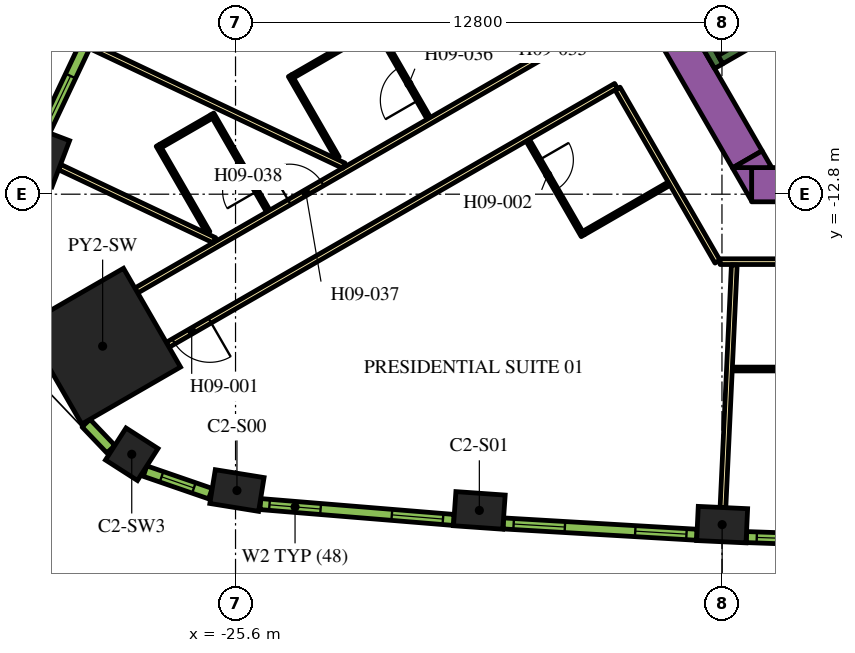
"""IFC4 building model, lengths in metres.
Left out: names, types, materials, properties, quantities, classifications, styles, units other than length and angle.
Written with IfcOpenShell. Run it as: python <this file> out.ifc"""

import sys

from ifc_helpers import new_model, si_unit, direction, frame, frame_2d, origin, origin_2d, place, context, subcontext, project, spatial, polyline, rectangle, outline, extrude, element, fill, save


model = new_model("IFC4")
c1 = context("Model", 3, precision=1e-05, world=origin(), true_north=direction((0.0, 1.0)))
c2 = subcontext(c1, "Body", "Model", "MODEL_VIEW")
j1 = project(units=[si_unit("LENGTHUNIT", "METRE"), si_unit("PLANEANGLEUNIT", "RADIAN")], contexts=[c1])
p1 = place(None, origin())
s1 = spatial("IfcSite", under=j1, at=p1, CompositionType="ELEMENT")
p2 = place(p1, origin())
s2 = spatial("IfcBuilding", under=s1, at=p2, CompositionType="ELEMENT")
p3 = place(p2, frame((0.0, 0.0, 122.7)))
s3 = spatial("IfcBuildingStorey", under=s2, at=p3, CompositionType="ELEMENT", Elevation=122.7)
p4 = place(p3, frame((-29.097, -16.799, 0.0), z_axis=(0.0, 0.0, 1.0), x_axis=(-0.866025403784, -0.5, 0.0)))
e1 = element("IfcColumn", 1, at=p4, inside=s3, PredefinedType="COLUMN", context=c2, shape_type="SweptSolid", body=[
    extrude(rectangle(XDim=3.0, YDim=3.0, at=origin_2d()), origin(), (0.0, 0.0, 1.0), 3.9),
])
for number, where, z_axis, x_axis in (
    (2, (-25.563, -20.597, 0.0), (0.0, 0.0, 1.0), (0.987, -0.159, 0.0)),
    (3, (-19.184, -21.12, 0.0), (0.0, 0.0, 1.0), (0.998, -0.07, 0.0)),
    (4, (-12.795, -21.494, 0.0), (0.0, 0.0, 1.0), (0.999, -0.047, 0.0)),
    (5, (-30.619, -11.839, 0.0), (0.0, 0.0, 1.0), (-0.355, -0.935, 0.0)),
):
    element("IfcColumn", number, at=place(p3, frame(where, z_axis=z_axis, x_axis=x_axis)), inside=s3, PredefinedType="COLUMN", context=c2, shape_type="SweptSolid", body=[
        extrude(rectangle(XDim=1.3, YDim=0.9, at=origin_2d()), origin(), (0.0, 0.0, 1.0), 3.9),
    ])
p5 = place(p3, frame((-28.331, -19.643, 0.0), z_axis=(0.0, 0.0, 1.0), x_axis=(0.841700252504, -0.53994507585, 0.0)))
e6 = element("IfcColumn", 6, at=p5, inside=s3, PredefinedType="COLUMN", context=c2, shape_type="SweptSolid", body=[
    extrude(rectangle(XDim=1.0, YDim=1.0, at=origin_2d()), origin(), (0.0, 0.0, 1.0), 3.9),
])
p6 = place(p3, frame((-12.019, -12.55, 0.0), z_axis=(0.0, 0.0, 1.0), x_axis=(1.0, 0.0, 0.0)))
e7 = element("IfcWall", 7, at=p6, inside=s3, PredefinedType="SOLIDWALL", context=c2, shape_type="SweptSolid", body=[
    extrude(rectangle(XDim=22.083, YDim=0.9, at=frame_2d((11.042, 0.0))), origin(), (0.0, 0.0, 1.0), 3.9),
])
p7 = place(p3, origin())
e8 = element("IfcWall", 8, at=p7, inside=s3, PredefinedType="SOLIDWALL", context=c2, shape_type="SweptSolid", body=[
    extrude(outline(polyline([(-12.529, -12.1), (-12.021, -12.1), (-12.021, -12.98), (-12.529, -12.1)])), origin(), (0.0, 0.0, 1.0), 3.9),
])
p8 = place(p3, frame((-12.134, -11.883, 0.0), z_axis=(0.0, 0.0, 1.0), x_axis=(-0.500005339912, 0.866022320763, 0.0)))
e9 = element("IfcWall", 9, at=p8, inside=s3, PredefinedType="SOLIDWALL", context=c2, shape_type="SweptSolid", body=[
    extrude(rectangle(XDim=9.488, YDim=0.9, at=frame_2d((4.744, 0.0))), origin(), (0.0, 0.0, 1.0), 3.9),
])
e10 = element("IfcWall", 10, at=p7, inside=s3, PredefinedType="SOLIDWALL", context=c2, shape_type="SweptSolid", body=[
    extrude(outline(polyline([(-11.489, -12.1), (-12.505, -12.1), (-11.743, -11.66), (-11.489, -12.1)])), origin(), (0.0, 0.0, 1.0), 3.9),
])
p9 = place(p3, frame((-12.885, -9.431, 0.0), z_axis=(0.0, 0.0, 1.0), x_axis=(-0.500020560727, 0.866013532718, 0.0)))
e11 = element("IfcWall", 11, at=p9, inside=s3, PredefinedType="SOLIDWALL", context=c2, shape_type="SweptSolid", body=[
    extrude(rectangle(XDim=3.45, YDim=0.25, at=frame_2d((1.725, 0.0))), origin(), (0.0, 0.0, 1.0), 3.9),
])
p10 = place(p3, frame((-12.84, -9.261, 0.0), z_axis=(0.0, 0.0, 1.0), x_axis=(0.866016039709, 0.500016218704, 0.0)))
e12 = element("IfcWall", 12, at=p10, inside=s3, PredefinedType="SOLIDWALL", context=c2, shape_type="SweptSolid", body=[
    extrude(rectangle(XDim=7.05, YDim=0.25, at=frame_2d((3.525, 0.0))), origin(), (0.0, 0.0, 1.0), 3.9),
])
p11 = place(p3, frame((-28.211, -15.335, 0.0), z_axis=(0.0, 0.0, 1.0), x_axis=(0.866025884867, 0.49999916674, 0.0)))
e13 = element("IfcWall", 13, at=p11, inside=s3, PredefinedType="PARTITIONING", context=c2, shape_type="SweptSolid", body=[
    extrude(rectangle(XDim=13.543, YDim=0.15, at=frame_2d((6.772, 0.0))), origin(), (0.0, 0.0, 1.0), 2.75),
])
p12 = place(p11, frame((12.114, 0.0, 0.0)))
e14 = element("IfcOpeningElement", 14, at=p12, cuts=e13, PredefinedType="OPENING", context=c2, shape_type="SweptSolid", body=[
    extrude(rectangle(XDim=1.1, YDim=2.1, at=frame_2d((0.55, 1.05))), frame((0.0, 0.085, 0.0), z_axis=(0.0, -1.0, 0.0), x_axis=(1.0, 0.0, 0.0)), (0.0, 0.0, 1.0), 0.17),
])
p13 = place(p11, frame((4.65, 0.0, 0.0)))
e15 = element("IfcOpeningElement", 15, at=p13, cuts=e13, PredefinedType="OPENING", context=c2, shape_type="SweptSolid", body=[
    extrude(rectangle(XDim=1.0, YDim=2.1, at=frame_2d((0.5, 1.05))), frame((0.0, 0.085, 0.0), z_axis=(0.0, -1.0, 0.0), x_axis=(1.0, 0.0, 0.0)), (0.0, 0.0, 1.0), 0.17),
])
p14 = place(p3, frame((-15.587, -9.952, 0.0), z_axis=(0.0, 0.0, 1.0), x_axis=(-0.866017869832, -0.500013048961, 0.0)))
e16 = element("IfcWall", 16, at=p14, inside=s3, PredefinedType="PARTITIONING", context=c2, shape_type="SweptSolid", body=[
    extrude(rectangle(XDim=13.624, YDim=0.15, at=frame_2d((6.812, 0.0))), origin(), (0.0, 0.0, 1.0), 2.75),
])
p15 = place(p14, frame((12.344, 0.0, 0.0)))
e17 = element("IfcOpeningElement", 17, at=p15, cuts=e16, PredefinedType="OPENING", context=c2, shape_type="SweptSolid", body=[
    extrude(rectangle(XDim=1.1, YDim=2.1, at=frame_2d((0.55, 1.05))), frame((0.0, 0.085, 0.0), z_axis=(0.0, -1.0, 0.0), x_axis=(1.0, 0.0, 0.0)), (0.0, 0.0, 1.0), 0.17),
])
p16 = place(p3, frame((-12.918, -14.575, 0.0), z_axis=(0.0, 0.0, 1.0), x_axis=(-0.500009150678, 0.866020120573, 0.0)))
e18 = element("IfcWall", 18, at=p16, inside=s3, PredefinedType="PARTITIONING", context=c2, shape_type="SweptSolid", body=[
    extrude(rectangle(XDim=5.258, YDim=0.15, at=frame_2d((2.629, 0.0))), origin(), (0.0, 0.0, 1.0), 2.75),
])
p17 = place(p3, frame((12.918, -14.575, 0.0), z_axis=(0.0, 0.0, 1.0), x_axis=(-1.0, 0.0, 0.0)))
e19 = element("IfcWall", 19, at=p17, inside=s3, PredefinedType="PARTITIONING", context=c2, shape_type="SweptSolid", body=[
    extrude(rectangle(XDim=25.766, YDim=0.15, at=frame_2d((12.883, 0.0))), origin(), (0.0, 0.0, 1.0), 2.75),
])
p18 = place(p17, frame((16.189, 0.0, 0.0)))
e20 = element("IfcOpeningElement", 20, at=p18, cuts=e19, PredefinedType="OPENING", context=c2, shape_type="SweptSolid", body=[
    extrude(rectangle(XDim=1.0, YDim=2.1, at=frame_2d((0.5, 1.05))), frame((0.0, 0.085, 0.0), z_axis=(0.0, -1.0, 0.0), x_axis=(1.0, 0.0, 0.0)), (0.0, 0.0, 1.0), 0.17),
])
p19 = place(p17, frame((14.882, 0.0, 0.0)))
e21 = element("IfcOpeningElement", 21, at=p19, cuts=e19, PredefinedType="OPENING", context=c2, shape_type="SweptSolid", body=[
    extrude(rectangle(XDim=1.0, YDim=2.1, at=frame_2d((0.5, 1.05))), frame((0.0, 0.085, 0.0), z_axis=(0.0, -1.0, 0.0), x_axis=(1.0, 0.0, 0.0)), (0.0, 0.0, 1.0), 0.17),
])
p20 = place(p17, frame((0.596, 0.0, 0.0)))
e22 = element("IfcOpeningElement", 22, at=p20, cuts=e19, PredefinedType="OPENING", context=c2, shape_type="SweptSolid", body=[
    extrude(rectangle(XDim=1.1, YDim=2.1, at=frame_2d((0.55, 1.05))), frame((0.0, 0.085, 0.0), z_axis=(0.0, -1.0, 0.0), x_axis=(1.0, 0.0, 0.0)), (0.0, 0.0, 1.0), 0.17),
])
p21 = place(p3, frame((-30.231, -12.085, 0.0), z_axis=(0.0, 0.0, 1.0), x_axis=(0.904001132572, -0.427530060122, 0.0)))
e23 = element("IfcWall", 23, at=p21, inside=s3, PredefinedType="PARTITIONING", context=c2, shape_type="SweptSolid", body=[
    extrude(rectangle(XDim=4.51, YDim=0.15, at=frame_2d((2.255, 0.0))), origin(), (0.0, 0.0, 1.0), 2.75),
])
p22 = place(p3, frame((-29.406, -8.901, 0.0), z_axis=(0.0, 0.0, 1.0), x_axis=(0.904002363742, -0.427527456836, 0.0)))
e24 = element("IfcWall", 24, at=p22, inside=s3, PredefinedType="PARTITIONING", context=c2, shape_type="SweptSolid", body=[
    extrude(rectangle(XDim=7.362, YDim=0.15, at=frame_2d((3.681, 0.0))), origin(), (0.0, 0.0, 1.0), 2.75),
])
p23 = place(p3, frame((-12.774, -21.045, 0.0), z_axis=(0.0, 0.0, 1.0), x_axis=(0.046750341626, 0.998906605023, 0.0)))
e25 = element("IfcWall", 25, at=p23, inside=s3, PredefinedType="PARTITIONING", context=c2, shape_type="SweptSolid", body=[
    extrude(rectangle(XDim=6.392, YDim=0.15, at=frame_2d((3.196, 0.0))), origin(), (0.0, 0.0, 1.0), 2.75),
])
p24 = place(p3, frame((-17.91, -11.38, 0.0), z_axis=(0.0, 0.0, 1.0), x_axis=(0.499987231761, -0.866032775405, 0.0)))
e26 = element("IfcWall", 26, at=p24, inside=s3, PredefinedType="PARTITIONING", context=c2, shape_type="SweptSolid", body=[
    extrude(rectangle(XDim=2.9, YDim=0.1, at=frame_2d((1.45, 0.0))), origin(), (0.0, 0.0, 1.0), 2.75),
])
p25 = place(p24, frame((0.6, 0.0, 0.0)))
e27 = element("IfcOpeningElement", 27, at=p25, cuts=e26, PredefinedType="OPENING", context=c2, shape_type="SweptSolid", body=[
    extrude(rectangle(XDim=0.9, YDim=2.1, at=frame_2d((0.45, 1.05))), frame((0.0, 0.06, 0.0), z_axis=(0.0, -1.0, 0.0), x_axis=(1.0, 0.0, 0.0)), (0.0, 0.0, 1.0), 0.12),
])
p26 = place(p3, frame((-16.442, -13.823, 0.0), z_axis=(0.0, 0.0, 1.0), x_axis=(0.866021400173, 0.500006934395, 0.0)))
e28 = element("IfcWall", 28, at=p26, inside=s3, PredefinedType="PARTITIONING", context=c2, shape_type="SweptSolid", body=[
    extrude(rectangle(XDim=2.6, YDim=0.1, at=frame_2d((1.3, 0.0))), origin(), (0.0, 0.0, 1.0), 2.75),
])
p27 = place(p3, frame((-10.072, -17.4, 0.0), z_axis=(0.0, 0.0, 1.0), x_axis=(-1.0, 0.0, 0.0)))
e29 = element("IfcWall", 29, at=p27, inside=s3, PredefinedType="PARTITIONING", context=c2, shape_type="SweptSolid", body=[
    extrude(rectangle(XDim=2.45, YDim=0.1, at=frame_2d((1.225, 0.0))), origin(), (0.0, 0.0, 1.0), 2.75),
])
p28 = place(p3, frame((-20.515, -10.805, 0.0), z_axis=(0.0, 0.0, 1.0), x_axis=(-0.49994636267, 0.866056369097, 0.0)))
e30 = element("IfcWall", 30, at=p28, inside=s3, PredefinedType="PARTITIONING", context=c2, shape_type="SweptSolid", body=[
    extrude(rectangle(XDim=2.8, YDim=0.1, at=frame_2d((1.4, 0.0))), origin(), (0.0, 0.0, 1.0), 2.75),
])
p29 = place(p28, frame((0.55, 0.0, 0.0)))
e31 = element("IfcOpeningElement", 31, at=p29, cuts=e30, PredefinedType="OPENING", context=c2, shape_type="SweptSolid", body=[
    extrude(rectangle(XDim=1.0, YDim=2.1, at=frame_2d((0.5, 1.05))), frame((0.0, 0.06, 0.0), z_axis=(0.0, -1.0, 0.0), x_axis=(1.0, 0.0, 0.0)), (0.0, 0.0, 1.0), 0.12),
])
for number, where, z_axis, x_axis in (
    (32, (-21.933, -8.448, 0.0), (0.0, 0.0, 1.0), (-0.866, -0.5, 0.0)),
    (33, (-22.916, -11.845, 0.0), (0.0, 0.0, 1.0), (-0.5, 0.866, 0.0)),
):
    element("IfcWall", number, at=place(p3, frame(where, z_axis=z_axis, x_axis=x_axis)), inside=s3, PredefinedType="PARTITIONING", context=c2, shape_type="SweptSolid", body=[
        extrude(rectangle(XDim=2.5, YDim=0.1, at=frame_2d((1.25, 0.0))), origin(), (0.0, 0.0, 1.0), 2.75),
    ])
p30 = place(p3, frame((-24.74, -13.244, 0.0), z_axis=(0.0, 0.0, 1.0), x_axis=(-0.500037662692, 0.866003658127, 0.0)))
e34 = element("IfcWall", 34, at=p30, inside=s3, PredefinedType="PARTITIONING", context=c2, shape_type="SweptSolid", body=[
    extrude(rectangle(XDim=2.95, YDim=0.1, at=frame_2d((1.475, 0.0))), origin(), (0.0, 0.0, 1.0), 2.75),
])
p31 = place(p30, frame((0.6, 0.0, 0.0)))
e35 = element("IfcOpeningElement", 35, at=p31, cuts=e34, PredefinedType="OPENING", context=c2, shape_type="SweptSolid", body=[
    extrude(rectangle(XDim=0.9, YDim=2.1, at=frame_2d((0.45, 1.05))), frame((0.0, 0.06, 0.0), z_axis=(0.0, -1.0, 0.0), x_axis=(1.0, 0.0, 0.0)), (0.0, 0.0, 1.0), 0.12),
])
p32 = place(p3, frame((-26.233, -10.758, 0.0), z_axis=(0.0, 0.0, 1.0), x_axis=(-0.866043940782, -0.499967891604, 0.0)))
e36 = element("IfcWall", 36, at=p32, inside=s3, PredefinedType="PARTITIONING", context=c2, shape_type="SweptSolid", body=[
    extrude(rectangle(XDim=1.55, YDim=0.1, at=frame_2d((0.775, 0.0))), origin(), (0.0, 0.0, 1.0), 2.75),
])
p33 = place(p3, frame((-26.319, -13.81, 0.0), z_axis=(0.0, 0.0, 1.0), x_axis=(-0.499953715521, 0.866052124492, 0.0)))
e37 = element("IfcWall", 37, at=p33, inside=s3, PredefinedType="PARTITIONING", context=c2, shape_type="SweptSolid", body=[
    extrude(rectangle(XDim=2.65, YDim=0.1, at=frame_2d((1.325, 0.0))), origin(), (0.0, 0.0, 1.0), 2.75),
])
p34 = place(p3, frame((-24.946, -20.954, 0.0), z_axis=(0.0, 0.0, 1.0), x_axis=(0.99665273362, -0.081751627308, 0.0)))
e38 = element("IfcWall", 38, at=p34, inside=s3, PredefinedType="SOLIDWALL", context=c2, shape_type="SweptSolid", body=[
    extrude(rectangle(XDim=5.107, YDim=0.29, at=frame_2d((2.553, 0.0))), origin(), (0.0, 0.0, 1.0), 3.65),
])
p35 = place(p34, frame((0.24, 0.0, 0.9)))
e39 = element("IfcOpeningElement", 39, at=p35, cuts=e38, PredefinedType="OPENING", context=c2, shape_type="SweptSolid", body=[
    extrude(rectangle(XDim=1.35, YDim=2.15, at=frame_2d((0.675, 1.075))), frame((0.0, 0.155, 0.0), z_axis=(0.0, -1.0, 0.0), x_axis=(1.0, 0.0, 0.0)), (0.0, 0.0, 1.0), 0.31),
])
p36 = place(p34, frame((3.471, 0.0, 0.9)))
e40 = element("IfcOpeningElement", 40, at=p36, cuts=e38, PredefinedType="OPENING", context=c2, shape_type="SweptSolid", body=[
    extrude(rectangle(XDim=1.35, YDim=2.15, at=frame_2d((0.675, 1.075))), frame((0.0, 0.155, 0.0), z_axis=(0.0, -1.0, 0.0), x_axis=(1.0, 0.0, 0.0)), (0.0, 0.0, 1.0), 0.31),
])
p37 = place(p3, frame((-18.553, -21.463, 0.0), z_axis=(0.0, 0.0, 1.0), x_axis=(0.998290511436, -0.058447025388, 0.0)))
e41 = element("IfcWall", 41, at=p37, inside=s3, PredefinedType="SOLIDWALL", context=c2, shape_type="SweptSolid", body=[
    extrude(rectangle(XDim=5.1, YDim=0.29, at=frame_2d((2.55, 0.0))), origin(), (0.0, 0.0, 1.0), 3.65),
])
p38 = place(p37, frame((0.273, 0.0, 0.9)))
e42 = element("IfcOpeningElement", 42, at=p38, cuts=e41, PredefinedType="OPENING", context=c2, shape_type="SweptSolid", body=[
    extrude(rectangle(XDim=1.35, YDim=2.15, at=frame_2d((0.675, 1.075))), frame((0.0, 0.155, 0.0), z_axis=(0.0, -1.0, 0.0), x_axis=(1.0, 0.0, 0.0)), (0.0, 0.0, 1.0), 0.31),
])
p39 = place(p37, frame((3.478, 0.0, 0.9)))
e43 = element("IfcOpeningElement", 43, at=p39, cuts=e41, PredefinedType="OPENING", context=c2, shape_type="SweptSolid", body=[
    extrude(rectangle(XDim=1.35, YDim=2.15, at=frame_2d((0.675, 1.075))), frame((0.0, 0.155, 0.0), z_axis=(0.0, -1.0, 0.0), x_axis=(1.0, 0.0, 0.0)), (0.0, 0.0, 1.0), 0.31),
])
p40 = place(p3, frame((-12.157, -21.822, 0.0), z_axis=(0.0, 0.0, 1.0), x_axis=(0.999385993957, -0.035037623812, 0.0)))
e44 = element("IfcWall", 44, at=p40, inside=s3, PredefinedType="SOLIDWALL", context=c2, shape_type="SweptSolid", body=[
    extrude(rectangle(XDim=5.101, YDim=0.29, at=frame_2d((2.55, 0.0))), origin(), (0.0, 0.0, 1.0), 3.65),
])
p41 = place(p40, frame((0.273, 0.0, 0.9)))
e45 = element("IfcOpeningElement", 45, at=p41, cuts=e44, PredefinedType="OPENING", context=c2, shape_type="SweptSolid", body=[
    extrude(rectangle(XDim=1.35, YDim=2.15, at=frame_2d((0.675, 1.075))), frame((0.0, 0.155, 0.0), z_axis=(0.0, -1.0, 0.0), x_axis=(1.0, 0.0, 0.0)), (0.0, 0.0, 1.0), 0.31),
])
p42 = place(p40, frame((3.478, 0.0, 0.9)))
e46 = element("IfcOpeningElement", 46, at=p42, cuts=e44, PredefinedType="OPENING", context=c2, shape_type="SweptSolid", body=[
    extrude(rectangle(XDim=1.35, YDim=2.15, at=frame_2d((0.675, 1.075))), frame((0.0, 0.155, 0.0), z_axis=(0.0, -1.0, 0.0), x_axis=(1.0, 0.0, 0.0)), (0.0, 0.0, 1.0), 0.31),
])
p43 = place(p3, frame((-28.436, -6.511, 0.0), z_axis=(0.0, 0.0, 1.0), x_axis=(-0.427543726596, -0.903994669148, 0.0)))
e47 = element("IfcWall", 47, at=p43, inside=s3, PredefinedType="SOLIDWALL", context=c2, shape_type="SweptSolid", body=[
    extrude(rectangle(XDim=5.107, YDim=0.29, at=frame_2d((2.553, 0.0))), origin(), (0.0, 0.0, 1.0), 3.65),
])
p44 = place(p43, frame((0.285, 0.0, 0.9)))
e48 = element("IfcOpeningElement", 48, at=p44, cuts=e47, PredefinedType="OPENING", context=c2, shape_type="SweptSolid", body=[
    extrude(rectangle(XDim=1.35, YDim=2.15, at=frame_2d((0.675, 1.075))), frame((0.0, 0.155, 0.0), z_axis=(0.0, -1.0, 0.0), x_axis=(1.0, 0.0, 0.0)), (0.0, 0.0, 1.0), 0.31),
])
p45 = place(p43, frame((3.516, 0.0, 0.9)))
e49 = element("IfcOpeningElement", 49, at=p45, cuts=e47, PredefinedType="OPENING", context=c2, shape_type="SweptSolid", body=[
    extrude(rectangle(XDim=1.35, YDim=2.15, at=frame_2d((0.675, 1.075))), frame((0.0, 0.155, 0.0), z_axis=(0.0, -1.0, 0.0), x_axis=(1.0, 0.0, 0.0)), (0.0, 0.0, 1.0), 0.31),
])
p46 = place(p3, frame((-29.534, -18.824, 0.0), z_axis=(0.0, 0.0, 1.0), x_axis=(0.690414427296, -0.723414071319, 0.0)))
e50 = element("IfcWall", 50, at=p46, inside=s3, PredefinedType="SOLIDWALL", context=c2, shape_type="SweptSolid", body=[
    extrude(rectangle(XDim=0.947, YDim=0.29, at=frame_2d((0.474, 0.0))), origin(), (0.0, 0.0, 1.0), 3.65),
])
p47 = place(p3, frame((-27.981, -20.086, 0.0), z_axis=(0.0, 0.0, 1.0), x_axis=(0.945385815453, -0.325953462844, 0.0)))
e51 = element("IfcWall", 51, at=p47, inside=s3, PredefinedType="SOLIDWALL", context=c2, shape_type="SweptSolid", body=[
    extrude(rectangle(XDim=1.819, YDim=0.29, at=frame_2d((0.91, 0.0))), origin(), (0.0, 0.0, 1.0), 3.65),
])
p48 = place(p47, frame((0.46, 0.0, 0.9)))
e52 = element("IfcOpeningElement", 52, at=p48, cuts=e51, PredefinedType="OPENING", context=c2, shape_type="SweptSolid", body=[
    extrude(rectangle(XDim=0.9, YDim=2.15, at=frame_2d((0.45, 1.075))), frame((0.0, 0.155, 0.0), z_axis=(0.0, -1.0, 0.0), x_axis=(1.0, 0.0, 0.0)), (0.0, 0.0, 1.0), 0.31),
])
p49 = place(p15, origin())
e53 = element("IfcDoor", 53, at=p49, inside=s3, OperationType="SINGLE_SWING_RIGHT", PredefinedType="DOOR", context=c2, shape_type="SweptSolid", body=[
    extrude(rectangle(XDim=1.1, YDim=2.1, at=frame_2d((0.55, 1.05))), frame((0.0, 0.025, 0.0), z_axis=(0.0, -1.0, 0.0), x_axis=(1.0, 0.0, 0.0)), (0.0, 0.0, 1.0), 0.05),
])
fill(e17, e53)
p50 = place(p25, origin())
e54 = element("IfcDoor", 54, at=p50, inside=s3, OperationType="SINGLE_SWING_LEFT", PredefinedType="DOOR", context=c2, shape_type="SweptSolid", body=[
    extrude(rectangle(XDim=0.9, YDim=2.1, at=frame_2d((0.45, 1.05))), frame((0.0, 0.025, 0.0), z_axis=(0.0, -1.0, 0.0), x_axis=(1.0, 0.0, 0.0)), (0.0, 0.0, 1.0), 0.05),
])
fill(e27, e54)
p51 = place(p12, origin())
e55 = element("IfcDoor", 55, at=p51, inside=s3, OperationType="SINGLE_SWING_RIGHT", PredefinedType="DOOR", context=c2, shape_type="SweptSolid", body=[
    extrude(rectangle(XDim=1.1, YDim=2.1, at=frame_2d((0.55, 1.05))), frame((0.0, 0.025, 0.0), z_axis=(0.0, -1.0, 0.0), x_axis=(1.0, 0.0, 0.0)), (0.0, 0.0, 1.0), 0.05),
])
fill(e14, e55)
p52 = place(p29, origin())
e56 = element("IfcDoor", 56, at=p52, inside=s3, OperationType="SINGLE_SWING_LEFT", PredefinedType="DOOR", context=c2, shape_type="SweptSolid", body=[
    extrude(rectangle(XDim=1.0, YDim=2.1, at=frame_2d((0.5, 1.05))), frame((0.0, 0.025, 0.0), z_axis=(0.0, -1.0, 0.0), x_axis=(1.0, 0.0, 0.0)), (0.0, 0.0, 1.0), 0.05),
])
fill(e31, e56)
p53 = place(p13, origin())
e57 = element("IfcDoor", 57, at=p53, inside=s3, OperationType="SINGLE_SWING_RIGHT", PredefinedType="DOOR", context=c2, shape_type="SweptSolid", body=[
    extrude(rectangle(XDim=1.0, YDim=2.1, at=frame_2d((0.5, 1.05))), frame((0.0, 0.025, 0.0), z_axis=(0.0, -1.0, 0.0), x_axis=(1.0, 0.0, 0.0)), (0.0, 0.0, 1.0), 0.05),
])
fill(e15, e57)
p54 = place(p31, origin())
e58 = element("IfcDoor", 58, at=p54, inside=s3, OperationType="SINGLE_SWING_LEFT", PredefinedType="DOOR", context=c2, shape_type="SweptSolid", body=[
    extrude(rectangle(XDim=0.9, YDim=2.1, at=frame_2d((0.45, 1.05))), frame((0.0, 0.025, 0.0), z_axis=(0.0, -1.0, 0.0), x_axis=(1.0, 0.0, 0.0)), (0.0, 0.0, 1.0), 0.05),
])
fill(e35, e58)
p55 = place(p35, origin())
e59 = element("IfcWindow", 59, at=p55, inside=s3, PartitioningType="DOUBLE_PANEL_VERTICAL", PredefinedType="WINDOW", context=c2, shape_type="SweptSolid", body=[
    extrude(rectangle(XDim=1.35, YDim=2.15, at=frame_2d((0.675, 1.075))), frame((0.0, 0.015, 0.0), z_axis=(0.0, -1.0, 0.0), x_axis=(1.0, 0.0, 0.0)), (0.0, 0.0, 1.0), 0.06),
])
fill(e39, e59)
p56 = place(p36, origin())
e60 = element("IfcWindow", 60, at=p56, inside=s3, PartitioningType="DOUBLE_PANEL_VERTICAL", PredefinedType="WINDOW", context=c2, shape_type="SweptSolid", body=[
    extrude(rectangle(XDim=1.35, YDim=2.15, at=frame_2d((0.675, 1.075))), frame((0.0, 0.015, 0.0), z_axis=(0.0, -1.0, 0.0), x_axis=(1.0, 0.0, 0.0)), (0.0, 0.0, 1.0), 0.06),
])
fill(e40, e60)
p57 = place(p38, origin())
e61 = element("IfcWindow", 61, at=p57, inside=s3, PartitioningType="DOUBLE_PANEL_VERTICAL", PredefinedType="WINDOW", context=c2, shape_type="SweptSolid", body=[
    extrude(rectangle(XDim=1.35, YDim=2.15, at=frame_2d((0.675, 1.075))), frame((0.0, 0.015, 0.0), z_axis=(0.0, -1.0, 0.0), x_axis=(1.0, 0.0, 0.0)), (0.0, 0.0, 1.0), 0.06),
])
fill(e42, e61)
p58 = place(p39, origin())
e62 = element("IfcWindow", 62, at=p58, inside=s3, PartitioningType="DOUBLE_PANEL_VERTICAL", PredefinedType="WINDOW", context=c2, shape_type="SweptSolid", body=[
    extrude(rectangle(XDim=1.35, YDim=2.15, at=frame_2d((0.675, 1.075))), frame((0.0, 0.015, 0.0), z_axis=(0.0, -1.0, 0.0), x_axis=(1.0, 0.0, 0.0)), (0.0, 0.0, 1.0), 0.06),
])
fill(e43, e62)
p59 = place(p41, origin())
e63 = element("IfcWindow", 63, at=p59, inside=s3, PartitioningType="DOUBLE_PANEL_VERTICAL", PredefinedType="WINDOW", context=c2, shape_type="SweptSolid", body=[
    extrude(rectangle(XDim=1.35, YDim=2.15, at=frame_2d((0.675, 1.075))), frame((0.0, 0.015, 0.0), z_axis=(0.0, -1.0, 0.0), x_axis=(1.0, 0.0, 0.0)), (0.0, 0.0, 1.0), 0.06),
])
fill(e45, e63)
p60 = place(p45, origin())
e64 = element("IfcWindow", 64, at=p60, inside=s3, PartitioningType="DOUBLE_PANEL_VERTICAL", PredefinedType="WINDOW", context=c2, shape_type="SweptSolid", body=[
    extrude(rectangle(XDim=1.35, YDim=2.15, at=frame_2d((0.675, 1.075))), frame((0.0, 0.015, 0.0), z_axis=(0.0, -1.0, 0.0), x_axis=(1.0, 0.0, 0.0)), (0.0, 0.0, 1.0), 0.06),
])
fill(e49, e64)
p61 = place(p48, origin())
e65 = element("IfcWindow", 65, at=p61, inside=s3, PartitioningType="SINGLE_PANEL", PredefinedType="WINDOW", context=c2, shape_type="SweptSolid", body=[
    extrude(rectangle(XDim=0.9, YDim=2.15, at=frame_2d((0.45, 1.075))), frame((0.0, 0.015, 0.0), z_axis=(0.0, -1.0, 0.0), x_axis=(1.0, 0.0, 0.0)), (0.0, 0.0, 1.0), 0.06),
])
fill(e52, e65)
save(model, sys.argv[1])
